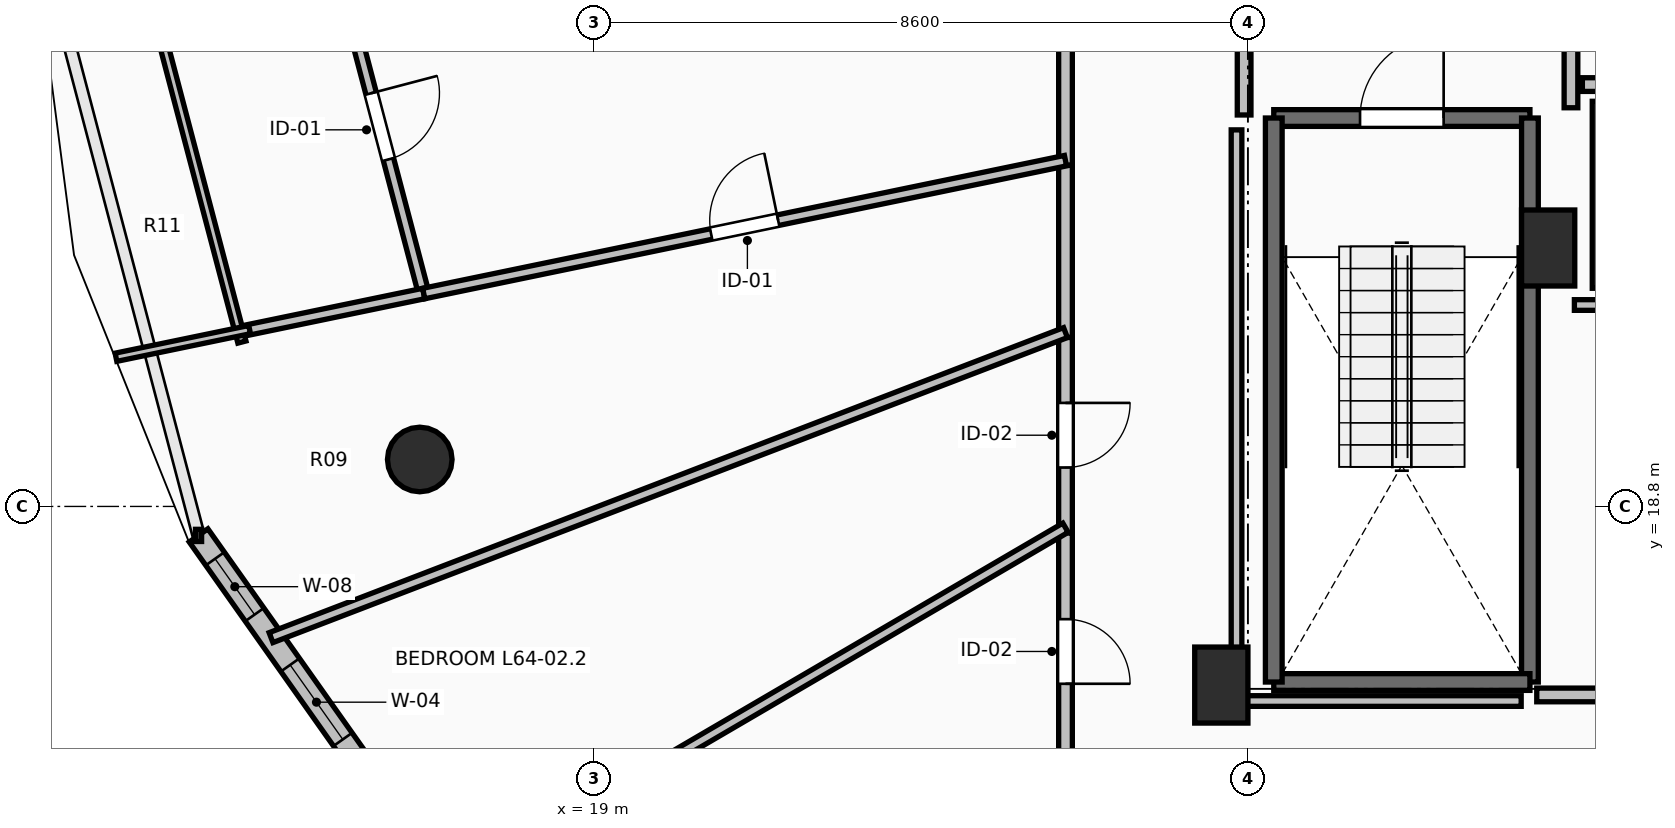
"""IFC4 building model, lengths in metres.
Left out: names, types, materials, properties, quantities, classifications, styles, units other than length and angle.
Written with IfcOpenShell. Run it as: python <this file> out.ifc"""

import sys

from ifc_helpers import new_model, si_unit, direction, frame, frame_2d, origin, origin_2d, place, context, subcontext, project, spatial, rectangle, circle, extrude, element, fill, save


model = new_model("IFC4")
c1 = context("Model", 3, precision=1e-05, world=origin(), true_north=direction((0.0, 1.0)))
c2 = subcontext(c1, "Body", "Model", "MODEL_VIEW")
j1 = project(units=[si_unit("LENGTHUNIT", "METRE"), si_unit("PLANEANGLEUNIT", "RADIAN")], contexts=[c1])
p1 = place(None, origin())
s1 = spatial("IfcSite", under=j1, at=p1, CompositionType="ELEMENT")
p2 = place(p1, origin())
s2 = spatial("IfcBuilding", under=s1, at=p2, CompositionType="ELEMENT")
p3 = place(p2, frame((0.0, 0.0, 237.8)))
s3 = spatial("IfcBuildingStorey", under=s2, at=p3, CompositionType="ELEMENT", Elevation=237.8)
p4 = place(p3, frame((16.705, 19.418, 0.0), z_axis=(0.0, 0.0, 1.0), x_axis=(-0.923879532511, -0.382683432365, 0.0)))
e1 = element("IfcColumn", 1, at=p4, inside=s3, PredefinedType="COLUMN", context=c2, shape_type="SweptSolid", body=[
    extrude(circle(Radius=0.425, at=origin_2d()), origin(), (0.0, 0.0, 1.0), 3.55),
])
for number, where, z_axis, x_axis in (
    (2, (27.25, 16.45, 0.0), (0.0, 0.0, 1.0), (1.0, 0.0, 0.0)),
    (3, (31.55, 22.2, 0.0), (0.0, 0.0, 1.0), (1.0, 0.0, 0.0)),
):
    element("IfcColumn", number, at=place(p3, frame(where, z_axis=z_axis, x_axis=x_axis)), inside=s3, PredefinedType="PILASTER", context=c2, shape_type="SweptSolid", body=[
        extrude(rectangle(XDim=0.7, YDim=1.0, at=origin_2d()), origin(), (0.0, 0.0, 1.0), 3.55),
    ])
p5 = place(p3, frame((13.794, 18.419, 0.0), z_axis=(0.0, 0.0, 1.0), x_axis=(0.577261247247, -0.816559521668, 0.0)))
e4 = element("IfcWall", 4, at=p5, inside=s3, PredefinedType="STANDARD", context=c2, shape_type="SweptSolid", body=[
    extrude(rectangle(XDim=4.194, YDim=0.3, at=frame_2d((2.097, 0.0))), origin(), (0.0, 0.0, 1.0), 3.29),
])
p6 = place(p5, frame((0.376, 0.0, 0.85)))
e5 = element("IfcOpeningElement", 5, at=p6, cuts=e4, PredefinedType="OPENING", context=c2, shape_type="SweptSolid", body=[
    extrude(rectangle(XDim=0.9, YDim=1.8, at=frame_2d((0.45, 0.9))), frame((0.0, 0.165, 0.0), z_axis=(0.0, -1.0, 0.0), x_axis=(1.0, 0.0, 0.0)), (0.0, 0.0, 1.0), 0.33),
])
p7 = place(p5, frame((2.087, 0.0, 0.85)))
e6 = element("IfcOpeningElement", 6, at=p7, cuts=e4, PredefinedType="OPENING", context=c2, shape_type="SweptSolid", body=[
    extrude(rectangle(XDim=1.2, YDim=1.95, at=frame_2d((0.6, 0.975))), frame((0.0, 0.165, 0.0), z_axis=(0.0, -1.0, 0.0), x_axis=(1.0, 0.0, 0.0)), (0.0, 0.0, 1.0), 0.33),
])
p8 = place(p3, frame((27.94, 23.91, 0.0), z_axis=(0.0, 0.0, 1.0), x_axis=(1.0, 0.0, 0.0)))
e7 = element("IfcWall", 7, at=p8, inside=s3, PredefinedType="SOLIDWALL", context=c2, shape_type="SweptSolid", body=[
    extrude(rectangle(XDim=3.37, YDim=0.22, at=frame_2d((1.685, 0.0))), origin(), (0.0, 0.0, 1.0), 3.29),
])
p9 = place(p8, frame((1.135, 0.0, 0.0)))
e8 = element("IfcOpeningElement", 8, at=p9, cuts=e7, PredefinedType="OPENING", context=c2, shape_type="SweptSolid", body=[
    extrude(rectangle(XDim=1.1, YDim=2.15, at=frame_2d((0.55, 1.075))), frame((0.0, 0.125, 0.0), z_axis=(0.0, -1.0, 0.0), x_axis=(1.0, 0.0, 0.0)), (0.0, 0.0, 1.0), 0.25),
])
p10 = place(p3, frame((31.31, 23.91, 0.0), z_axis=(0.0, 0.0, 1.0), x_axis=(0.0, -1.0, 0.0)))
e9 = element("IfcWall", 9, at=p10, inside=s3, PredefinedType="SOLIDWALL", context=c2, shape_type="SweptSolid", body=[
    extrude(rectangle(XDim=7.42, YDim=0.22, at=frame_2d((3.71, 0.0))), origin(), (0.0, 0.0, 1.0), 3.29),
])
p11 = place(p3, frame((31.31, 16.49, 0.0), z_axis=(0.0, 0.0, 1.0), x_axis=(-1.0, 0.0, 0.0)))
e10 = element("IfcWall", 10, at=p11, inside=s3, PredefinedType="SOLIDWALL", context=c2, shape_type="SweptSolid", body=[
    extrude(rectangle(XDim=3.37, YDim=0.22, at=frame_2d((1.685, 0.0))), origin(), (0.0, 0.0, 1.0), 3.29),
])
p12 = place(p3, frame((27.94, 16.49, 0.0), z_axis=(0.0, 0.0, 1.0), x_axis=(0.0, 1.0, 0.0)))
e11 = element("IfcWall", 11, at=p12, inside=s3, PredefinedType="SOLIDWALL", context=c2, shape_type="SweptSolid", body=[
    extrude(rectangle(XDim=7.42, YDim=0.22, at=frame_2d((3.71, 0.0))), origin(), (0.0, 0.0, 1.0), 3.29),
])
p13 = place(p3, frame((31.85, 24.045, 0.0), z_axis=(0.0, 0.0, 1.0), x_axis=(0.0, 1.0, 0.0)))
e12 = element("IfcWall", 12, at=p13, inside=s3, PredefinedType="PARTITIONING", context=c2, shape_type="SweptSolid", body=[
    extrude(rectangle(XDim=3.91, YDim=0.18, at=frame_2d((1.955, 0.0))), origin(), (0.0, 0.0, 1.0), 3.29),
])
p14 = place(p13, frame((1.355, 0.0, 0.0)))
e13 = element("IfcOpeningElement", 13, at=p14, cuts=e12, PredefinedType="OPENING", context=c2, shape_type="SweptSolid", body=[
    extrude(rectangle(XDim=1.2, YDim=2.15, at=frame_2d((0.6, 1.075))), frame((0.0, 0.105, 0.0), z_axis=(0.0, -1.0, 0.0), x_axis=(1.0, 0.0, 0.0)), (0.0, 0.0, 1.0), 0.21),
])
p15 = place(p3, frame((27.55, 28.0, 0.0), z_axis=(0.0, 0.0, 1.0), x_axis=(0.0, -1.0, 0.0)))
e14 = element("IfcWall", 14, at=p15, inside=s3, PredefinedType="PARTITIONING", context=c2, shape_type="SweptSolid", body=[
    extrude(rectangle(XDim=4.05, YDim=0.18, at=frame_2d((2.025, 0.0))), origin(), (0.0, 0.0, 1.0), 3.29),
])
p16 = place(p15, frame((1.425, 0.0, 0.0)))
e15 = element("IfcOpeningElement", 15, at=p16, cuts=e14, PredefinedType="OPENING", context=c2, shape_type="SweptSolid", body=[
    extrude(rectangle(XDim=1.2, YDim=2.15, at=frame_2d((0.6, 1.075))), frame((0.0, 0.105, 0.0), z_axis=(0.0, -1.0, 0.0), x_axis=(1.0, 0.0, 0.0)), (0.0, 0.0, 1.0), 0.21),
])
p17 = place(p3, frame((32.0, 24.35, 0.0), z_axis=(0.0, 0.0, 1.0), x_axis=(1.0, 0.0, 0.0)))
e16 = element("IfcWall", 16, at=p17, inside=s3, PredefinedType="PARTITIONING", context=c2, shape_type="SweptSolid", body=[
    extrude(rectangle(XDim=3.04, YDim=0.18, at=frame_2d((1.52, 0.0))), origin(), (0.0, 0.0, 1.0), 3.29),
])
p18 = place(p17, frame((1.095, 0.0, 0.0)))
e17 = element("IfcOpeningElement", 17, at=p18, cuts=e16, PredefinedType="OPENING", context=c2, shape_type="SweptSolid", body=[
    extrude(rectangle(XDim=0.85, YDim=2.1, at=frame_2d((0.425, 1.05))), frame((0.0, 0.105, 0.0), z_axis=(0.0, -1.0, 0.0), x_axis=(1.0, 0.0, 0.0)), (0.0, 0.0, 1.0), 0.21),
])
p19 = place(p3, frame((35.005, 21.45, 0.0), z_axis=(0.0, 0.0, 1.0), x_axis=(-1.0, 0.0, 0.0)))
e18 = element("IfcWall", 18, at=p19, inside=s3, PredefinedType="PARTITIONING", context=c2, shape_type="SweptSolid", body=[
    extrude(rectangle(XDim=3.11, YDim=0.14, at=frame_2d((1.555, 0.0))), origin(), (0.0, 0.0, 1.0), 3.29),
])
p20 = place(p3, frame((31.4, 16.32, 0.0), z_axis=(0.0, 0.0, 1.0), x_axis=(1.0, 0.0, 0.0)))
e19 = element("IfcWall", 19, at=p20, inside=s3, PredefinedType="PARTITIONING", context=c2, shape_type="SweptSolid", body=[
    extrude(rectangle(XDim=7.4, YDim=0.18, at=frame_2d((3.7, 0.0))), origin(), (0.0, 0.0, 1.0), 3.29),
])
p21 = place(p20, frame((3.275, 0.0, 0.0)))
e20 = element("IfcOpeningElement", 20, at=p21, cuts=e19, PredefinedType="OPENING", context=c2, shape_type="SweptSolid", body=[
    extrude(rectangle(XDim=0.85, YDim=2.1, at=frame_2d((0.425, 1.05))), frame((0.0, 0.105, 0.0), z_axis=(0.0, -1.0, 0.0), x_axis=(1.0, 0.0, 0.0)), (0.0, 0.0, 1.0), 0.21),
])
p22 = place(p3, frame((25.2, 27.735, 0.0), z_axis=(0.0, 0.0, 1.0), x_axis=(0.0, -1.0, 0.0)))
e21 = element("IfcWall", 21, at=p22, inside=s3, PredefinedType="PARTITIONING", context=c2, shape_type="SweptSolid", body=[
    extrude(rectangle(XDim=4.447, YDim=0.18, at=frame_2d((2.224, 0.0))), origin(), (0.0, 0.0, 1.0), 2.482),
])
p23 = place(p22, frame((1.723, 0.0, 0.0)))
e22 = element("IfcOpeningElement", 22, at=p23, cuts=e21, PredefinedType="OPENING", context=c2, shape_type="SweptSolid", body=[
    extrude(rectangle(XDim=1.0, YDim=2.15, at=frame_2d((0.5, 1.075))), frame((0.0, 0.105, 0.0), z_axis=(0.0, -1.0, 0.0), x_axis=(1.0, 0.0, 0.0)), (0.0, 0.0, 1.0), 0.21),
])
p24 = place(p3, frame((25.2, 23.288, 0.0), z_axis=(0.0, 0.0, 1.0), x_axis=(0.0, -1.0, 0.0)))
e23 = element("IfcWall", 23, at=p24, inside=s3, PredefinedType="PARTITIONING", context=c2, shape_type="SweptSolid", body=[
    extrude(rectangle(XDim=2.265, YDim=0.18, at=frame_2d((1.133, 0.0))), origin(), (0.0, 0.0, 1.0), 3.29),
])
p25 = place(p3, frame((25.2, 21.023, 0.0), z_axis=(0.0, 0.0, 1.0), x_axis=(0.0, -1.0, 0.0)))
e24 = element("IfcWall", 24, at=p25, inside=s3, PredefinedType="PARTITIONING", context=c2, shape_type="SweptSolid", body=[
    extrude(rectangle(XDim=2.572, YDim=0.18, at=frame_2d((1.286, 0.0))), origin(), (0.0, 0.0, 1.0), 3.29),
])
p26 = place(p25, frame((0.861, 0.0, 0.0)))
e25 = element("IfcOpeningElement", 25, at=p26, cuts=e24, PredefinedType="OPENING", context=c2, shape_type="SweptSolid", body=[
    extrude(rectangle(XDim=0.85, YDim=2.1, at=frame_2d((0.425, 1.05))), frame((0.0, 0.105, 0.0), z_axis=(0.0, -1.0, 0.0), x_axis=(1.0, 0.0, 0.0)), (0.0, 0.0, 1.0), 0.21),
])
p27 = place(p3, frame((25.2, 18.451, 0.0), z_axis=(0.0, 0.0, 1.0), x_axis=(0.0, -1.0, 0.0)))
e26 = element("IfcWall", 26, at=p27, inside=s3, PredefinedType="PARTITIONING", context=c2, shape_type="SweptSolid", body=[
    extrude(rectangle(XDim=3.118, YDim=0.18, at=frame_2d((1.559, 0.0))), origin(), (0.0, 0.0, 1.0), 2.482),
])
p28 = place(p27, frame((1.134, 0.0, 0.0)))
e27 = element("IfcOpeningElement", 27, at=p28, cuts=e26, PredefinedType="OPENING", context=c2, shape_type="SweptSolid", body=[
    extrude(rectangle(XDim=0.85, YDim=2.1, at=frame_2d((0.425, 1.05))), frame((0.0, 0.105, 0.0), z_axis=(0.0, -1.0, 0.0), x_axis=(1.0, 0.0, 0.0)), (0.0, 0.0, 1.0), 0.21),
])
p29 = place(p3, frame((15.6, 26.0, 0.0), z_axis=(0.0, 0.0, 1.0), x_axis=(0.25436383836, -0.967108596661, 0.0)))
e28 = element("IfcWall", 28, at=p29, inside=s3, PredefinedType="PARTITIONING", context=c2, shape_type="SweptSolid", body=[
    extrude(rectangle(XDim=4.549, YDim=0.14, at=frame_2d((2.274, 0.0))), origin(), (0.0, 0.0, 1.0), 2.482),
])
p30 = place(p29, frame((1.824, 0.0, 0.0)))
e29 = element("IfcOpeningElement", 29, at=p30, cuts=e28, PredefinedType="OPENING", context=c2, shape_type="SweptSolid", body=[
    extrude(rectangle(XDim=0.9, YDim=2.1, at=frame_2d((0.45, 1.05))), frame((0.0, 0.085, 0.0), z_axis=(0.0, -1.0, 0.0), x_axis=(1.0, 0.0, 0.0)), (0.0, 0.0, 1.0), 0.17),
])
p31 = place(p3, frame((16.757, 21.601, 0.0), z_axis=(0.0, 0.0, 1.0), x_axis=(-0.979193678003, -0.2029279206, 0.0)))
e30 = element("IfcWall", 30, at=p31, inside=s3, PredefinedType="PARTITIONING", context=c2, shape_type="SweptSolid", body=[
    extrude(rectangle(XDim=2.479, YDim=0.14, at=frame_2d((1.24, 0.0))), origin(), (0.0, 0.0, 1.0), 2.874),
])
p32 = place(p3, frame((16.757, 21.601, 0.0), z_axis=(0.0, 0.0, 1.0), x_axis=(0.979226116247, 0.20277133244, 0.0)))
e31 = element("IfcWall", 31, at=p32, inside=s3, PredefinedType="PARTITIONING", context=c2, shape_type="SweptSolid", body=[
    extrude(rectangle(XDim=8.622, YDim=0.14, at=frame_2d((4.311, 0.0))), origin(), (0.0, 0.0, 1.0), 2.924),
])
p33 = place(p32, frame((3.861, 0.0, 0.0)))
e32 = element("IfcOpeningElement", 32, at=p33, cuts=e31, PredefinedType="OPENING", context=c2, shape_type="SweptSolid", body=[
    extrude(rectangle(XDim=0.9, YDim=2.1, at=frame_2d((0.45, 1.05))), frame((0.0, 0.085, 0.0), z_axis=(0.0, -1.0, 0.0), x_axis=(1.0, 0.0, 0.0)), (0.0, 0.0, 1.0), 0.17),
])
p34 = place(p3, frame((14.365, 20.963, 0.0), z_axis=(0.0, 0.0, 1.0), x_axis=(-0.254288836667, 0.967128320104, 0.0)))
e33 = element("IfcWall", 33, at=p34, inside=s3, PredefinedType="PARTITIONING", context=c2, shape_type="SweptSolid", body=[
    extrude(rectangle(XDim=5.349, YDim=0.11, at=frame_2d((2.674, 0.0))), origin(), (0.0, 0.0, 1.0), 3.29),
])
p35 = place(p3, frame((12.708, 20.763, 0.0), z_axis=(0.0, 0.0, 1.0), x_axis=(0.979256697864, 0.202623591143, 0.0)))
e34 = element("IfcWall", 34, at=p35, inside=s3, PredefinedType="PARTITIONING", context=c2, shape_type="SweptSolid", body=[
    extrude(rectangle(XDim=1.795, YDim=0.11, at=frame_2d((0.898, 0.0))), origin(), (0.0, 0.0, 1.0), 3.29),
])
p36 = place(p3, frame((14.748, 17.074, 0.0), z_axis=(0.0, 0.0, 1.0), x_axis=(0.93355564233, 0.358432507836, 0.0)))
e35 = element("IfcWall", 35, at=p36, inside=s3, PredefinedType="PARTITIONING", context=c2, shape_type="SweptSolid", body=[
    extrude(rectangle(XDim=11.196, YDim=0.14, at=frame_2d((5.598, 0.0))), origin(), (0.0, 0.0, 1.0), 2.482),
])
p37 = place(p3, frame((17.363, 13.941, 0.0), z_axis=(0.0, 0.0, 1.0), x_axis=(0.863415767124, 0.5044930258, 0.0)))
e36 = element("IfcWall", 36, at=p37, inside=s3, PredefinedType="PARTITIONING", context=c2, shape_type="SweptSolid", body=[
    extrude(rectangle(XDim=9.077, YDim=0.14, at=frame_2d((4.538, 0.0))), origin(), (0.0, 0.0, 1.0), 2.482),
])
p38 = place(p3, frame((32.2, 24.13, 0.0), z_axis=(0.0, 0.0, 1.0), x_axis=(0.0, -1.0, 0.0)))
e37 = element("IfcWall", 37, at=p38, inside=s3, PredefinedType="PARTITIONING", context=c2, shape_type="SweptSolid", body=[
    extrude(rectangle(XDim=2.46, YDim=0.14, at=frame_2d((1.23, 0.0))), origin(), (0.0, 0.0, 1.0), 2.482),
])
p39 = place(p3, frame((27.45, 23.754, 0.0), z_axis=(0.0, 0.0, 1.0), x_axis=(0.0, -1.0, 0.0)))
e38 = element("IfcWall", 38, at=p39, inside=s3, PredefinedType="PARTITIONING", context=c2, shape_type="SweptSolid", body=[
    extrude(rectangle(XDim=7.514, YDim=0.14, at=frame_2d((3.757, 0.0))), origin(), (0.0, 0.0, 1.0), 2.482),
])
p40 = place(p3, frame((27.45, 16.24, 0.0), z_axis=(0.0, 0.0, 1.0), x_axis=(1.0, 0.0, 0.0)))
e39 = element("IfcWall", 39, at=p40, inside=s3, PredefinedType="PARTITIONING", context=c2, shape_type="SweptSolid", body=[
    extrude(rectangle(XDim=3.745, YDim=0.14, at=frame_2d((1.873, 0.0))), origin(), (0.0, 0.0, 1.0), 2.482),
])
p41 = place(p6, origin())
e40 = element("IfcWindow", 40, at=p41, inside=s3, PartitioningType="SINGLE_PANEL", PredefinedType="WINDOW", context=c2, shape_type="SweptSolid", body=[
    extrude(rectangle(XDim=0.9, YDim=1.8, at=frame_2d((0.45, 0.9))), frame((0.0, 0.03, 0.0), z_axis=(0.0, -1.0, 0.0), x_axis=(1.0, 0.0, 0.0)), (0.0, 0.0, 1.0), 0.06),
])
fill(e5, e40)
p42 = place(p7, origin())
e41 = element("IfcWindow", 41, at=p42, inside=s3, PartitioningType="SINGLE_PANEL", PredefinedType="WINDOW", context=c2, shape_type="SweptSolid", body=[
    extrude(rectangle(XDim=1.2, YDim=1.95, at=frame_2d((0.6, 0.975))), frame((0.0, 0.03, 0.0), z_axis=(0.0, -1.0, 0.0), x_axis=(1.0, 0.0, 0.0)), (0.0, 0.0, 1.0), 0.06),
])
fill(e6, e41)
p43 = place(p9, origin())
e42 = element("IfcDoor", 42, at=p43, inside=s3, OperationType="SINGLE_SWING_RIGHT", PredefinedType="DOOR", context=c2, shape_type="SweptSolid", body=[
    extrude(rectangle(XDim=1.1, YDim=2.15, at=frame_2d((0.55, 1.075))), frame((0.0, 0.025, 0.0), z_axis=(0.0, -1.0, 0.0), x_axis=(1.0, 0.0, 0.0)), (0.0, 0.0, 1.0), 0.05),
])
fill(e8, e42)
p44 = place(p30, origin())
e43 = element("IfcDoor", 43, at=p44, inside=s3, OperationType="SINGLE_SWING_LEFT", PredefinedType="DOOR", context=c2, shape_type="SweptSolid", body=[
    extrude(rectangle(XDim=0.9, YDim=2.1, at=frame_2d((0.45, 1.05))), frame((0.0, 0.025, 0.0), z_axis=(0.0, -1.0, 0.0), x_axis=(1.0, 0.0, 0.0)), (0.0, 0.0, 1.0), 0.05),
])
fill(e29, e43)
p45 = place(p33, origin())
e44 = element("IfcDoor", 44, at=p45, inside=s3, OperationType="SINGLE_SWING_RIGHT", PredefinedType="DOOR", context=c2, shape_type="SweptSolid", body=[
    extrude(rectangle(XDim=0.9, YDim=2.1, at=frame_2d((0.45, 1.05))), frame((0.0, 0.025, 0.0), z_axis=(0.0, -1.0, 0.0), x_axis=(1.0, 0.0, 0.0)), (0.0, 0.0, 1.0), 0.05),
])
fill(e32, e44)
p46 = place(p26, origin())
e45 = element("IfcDoor", 45, at=p46, inside=s3, OperationType="SINGLE_SWING_LEFT", PredefinedType="DOOR", context=c2, shape_type="SweptSolid", body=[
    extrude(rectangle(XDim=0.85, YDim=2.1, at=frame_2d((0.425, 1.05))), frame((0.0, 0.025, 0.0), z_axis=(0.0, -1.0, 0.0), x_axis=(1.0, 0.0, 0.0)), (0.0, 0.0, 1.0), 0.05),
])
fill(e25, e45)
p47 = place(p28, origin())
e46 = element("IfcDoor", 46, at=p47, inside=s3, OperationType="SINGLE_SWING_RIGHT", PredefinedType="DOOR", context=c2, shape_type="SweptSolid", body=[
    extrude(rectangle(XDim=0.85, YDim=2.1, at=frame_2d((0.425, 1.05))), frame((0.0, 0.025, 0.0), z_axis=(0.0, -1.0, 0.0), x_axis=(1.0, 0.0, 0.0)), (0.0, 0.0, 1.0), 0.05),
])
fill(e27, e46)
save(model, sys.argv[1])
